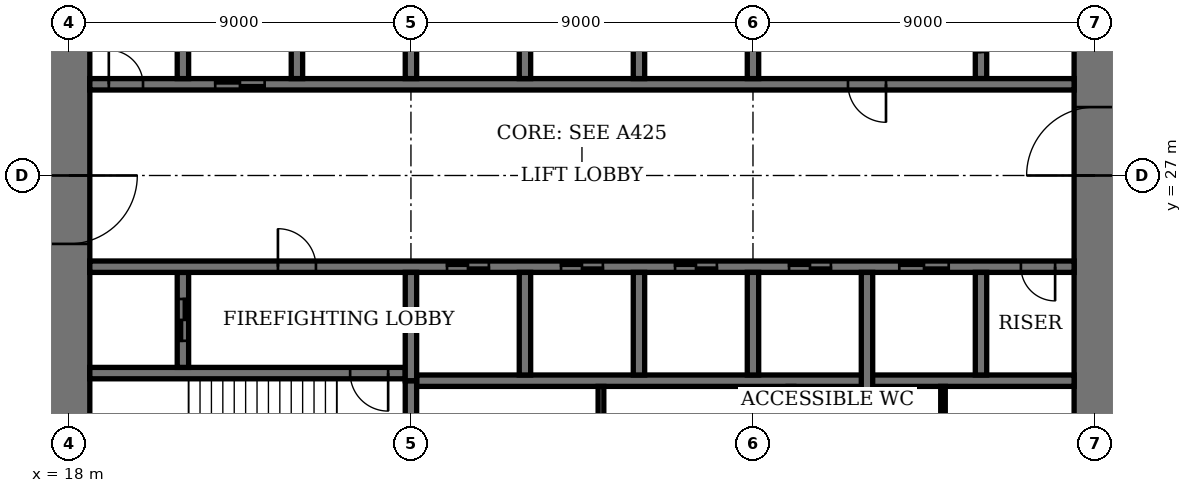
"""IFC4 building model, lengths in metres.
Left out: names, types, materials, properties, quantities, classifications, styles, units other than length and angle.
Written with IfcOpenShell. Run it as: python <this file> out.ifc"""

import sys

from ifc_helpers import new_model, si_unit, direction, frame, frame_2d, origin, place, context, subcontext, project, spatial, rectangle, extrude, element, fill, save


model = new_model("IFC4")
c1 = context("Model", 3, precision=1e-05, world=origin(), true_north=direction((0.0, 1.0)))
c2 = subcontext(c1, "Body", "Model", "MODEL_VIEW")
j1 = project(units=[si_unit("LENGTHUNIT", "METRE"), si_unit("PLANEANGLEUNIT", "RADIAN")], contexts=[c1])
p1 = place(None, origin())
s1 = spatial("IfcSite", under=j1, at=p1, CompositionType="ELEMENT")
p2 = place(p1, origin())
s2 = spatial("IfcBuilding", under=s1, at=p2, CompositionType="ELEMENT")
p3 = place(p2, frame((0.0, 0.0, 51.8)))
s3 = spatial("IfcBuildingStorey", under=s2, at=p3, CompositionType="ELEMENT", Elevation=51.8)
p4 = place(p3, frame((18.0, 35.45, 0.0), z_axis=(0.0, 0.0, 1.0), x_axis=(0.0, -1.0, 0.0)))
e1 = element("IfcWall", 1, at=p4, inside=s3, PredefinedType="SHEAR", context=c2, shape_type="SweptSolid", body=[
    extrude(rectangle(XDim=16.9, YDim=1.1, at=frame_2d((8.45, 0.0))), origin(), (0.0, 0.0, 1.0), 4.0),
])
p5 = place(p4, frame((8.45, 0.0, 0.0)))
e2 = element("IfcOpeningElement", 2, at=p5, cuts=e1, PredefinedType="OPENING", context=c2, shape_type="SweptSolid", body=[
    extrude(rectangle(XDim=1.8, YDim=2.4, at=frame_2d((0.9, 1.2))), frame((0.0, 0.56, 0.0), z_axis=(0.0, -1.0, 0.0), x_axis=(1.0, 0.0, 0.0)), (0.0, 0.0, 1.0), 1.12),
])
p6 = place(p3, frame((45.0, 18.55, 0.0), z_axis=(0.0, 0.0, 1.0), x_axis=(0.0, 1.0, 0.0)))
e3 = element("IfcWall", 3, at=p6, inside=s3, PredefinedType="SHEAR", context=c2, shape_type="SweptSolid", body=[
    extrude(rectangle(XDim=16.9, YDim=1.1, at=frame_2d((8.45, 0.0))), origin(), (0.0, 0.0, 1.0), 4.0),
])
p7 = place(p6, frame((8.45, 0.0, 0.0)))
e4 = element("IfcOpeningElement", 4, at=p7, cuts=e3, PredefinedType="OPENING", context=c2, shape_type="SweptSolid", body=[
    extrude(rectangle(XDim=1.8, YDim=2.4, at=frame_2d((0.9, 1.2))), frame((0.0, 0.56, 0.0), z_axis=(0.0, -1.0, 0.0), x_axis=(1.0, 0.0, 0.0)), (0.0, 0.0, 1.0), 1.12),
])
p8 = place(p3, frame((18.55, 21.8, 0.0), z_axis=(0.0, 0.0, 1.0), x_axis=(1.0, 0.0, 0.0)))
e5 = element("IfcWall", 5, at=p8, inside=s3, PredefinedType="SHEAR", context=c2, shape_type="SweptSolid", body=[
    extrude(rectangle(XDim=8.3, YDim=0.3, at=frame_2d((4.15, 0.0))), origin(), (0.0, 0.0, 1.0), 4.0),
])
p9 = place(p8, frame((6.85, 0.0, 0.0)))
e6 = element("IfcOpeningElement", 6, at=p9, cuts=e5, PredefinedType="OPENING", context=c2, shape_type="SweptSolid", body=[
    extrude(rectangle(XDim=1.0, YDim=2.4, at=frame_2d((0.5, 1.2))), frame((0.0, 0.16, 0.0), z_axis=(0.0, -1.0, 0.0), x_axis=(1.0, 0.0, 0.0)), (0.0, 0.0, 1.0), 0.32),
])
p10 = place(p3, frame((27.0, 18.55, 0.0), z_axis=(0.0, 0.0, 1.0), x_axis=(0.0, 1.0, 0.0)))
e7 = element("IfcWall", 7, at=p10, inside=s3, PredefinedType="SHEAR", context=c2, shape_type="SweptSolid", body=[
    extrude(rectangle(XDim=3.05, YDim=0.3, at=frame_2d((1.525, 0.0))), origin(), (0.0, 0.0, 1.0), 4.0),
])
p11 = place(p3, frame((21.0, 21.95, 0.0), z_axis=(0.0, 0.0, 1.0), x_axis=(0.0, 1.0, 0.0)))
e8 = element("IfcWall", 8, at=p11, inside=s3, PredefinedType="SHEAR", context=c2, shape_type="SweptSolid", body=[
    extrude(rectangle(XDim=2.5, YDim=0.3, at=frame_2d((1.25, 0.0))), origin(), (0.0, 0.0, 1.0), 4.0),
])
p12 = place(p11, frame((0.7, 0.0, 0.0)))
e9 = element("IfcOpeningElement", 9, at=p12, cuts=e8, PredefinedType="OPENING", context=c2, shape_type="SweptSolid", body=[
    extrude(rectangle(XDim=1.1, YDim=2.4, at=frame_2d((0.55, 1.2))), frame((0.0, 0.16, 0.0), z_axis=(0.0, -1.0, 0.0), x_axis=(1.0, 0.0, 0.0)), (0.0, 0.0, 1.0), 0.32),
])
p13 = place(p3, frame((42.0, 29.55, 0.0), z_axis=(0.0, 0.0, 1.0), x_axis=(0.0, 1.0, 0.0)))
e10 = element("IfcWall", 10, at=p13, inside=s3, PredefinedType="SHEAR", context=c2, shape_type="SweptSolid", body=[
    extrude(rectangle(XDim=2.5, YDim=0.3, at=frame_2d((1.25, 0.0))), origin(), (0.0, 0.0, 1.0), 4.0),
])
p14 = place(p13, frame((0.7, 0.0, 0.0)))
e11 = element("IfcOpeningElement", 11, at=p14, cuts=e10, PredefinedType="OPENING", context=c2, shape_type="SweptSolid", body=[
    extrude(rectangle(XDim=1.1, YDim=2.4, at=frame_2d((0.55, 1.2))), frame((0.0, 0.16, 0.0), z_axis=(0.0, -1.0, 0.0), x_axis=(1.0, 0.0, 0.0)), (0.0, 0.0, 1.0), 0.32),
])
p15 = place(p3, frame((18.55, 24.6, 0.0), z_axis=(0.0, 0.0, 1.0), x_axis=(1.0, 0.0, 0.0)))
e12 = element("IfcWall", 12, at=p15, inside=s3, PredefinedType="SHEAR", context=c2, shape_type="SweptSolid", body=[
    extrude(rectangle(XDim=25.9, YDim=0.3, at=frame_2d((12.95, 0.0))), origin(), (0.0, 0.0, 1.0), 4.0),
])
p16 = place(p15, frame((4.95, 0.0, 0.0)))
e13 = element("IfcOpeningElement", 13, at=p16, cuts=e12, PredefinedType="OPENING", context=c2, shape_type="SweptSolid", body=[
    extrude(rectangle(XDim=1.0, YDim=2.4, at=frame_2d((0.5, 1.2))), frame((0.0, 0.16, 0.0), z_axis=(0.0, -1.0, 0.0), x_axis=(1.0, 0.0, 0.0)), (0.0, 0.0, 1.0), 0.32),
])
p17 = place(p15, frame((24.5, 0.0, 0.0)))
e14 = element("IfcOpeningElement", 14, at=p17, cuts=e12, PredefinedType="OPENING", context=c2, shape_type="SweptSolid", body=[
    extrude(rectangle(XDim=0.9, YDim=2.1, at=frame_2d((0.45, 1.05))), frame((0.0, 0.16, 0.0), z_axis=(0.0, -1.0, 0.0), x_axis=(1.0, 0.0, 0.0)), (0.0, 0.0, 1.0), 0.32),
])
p18 = place(p15, frame((9.4, 0.0, 0.0)))
e15 = element("IfcOpeningElement", 15, at=p18, cuts=e12, PredefinedType="OPENING", context=c2, shape_type="SweptSolid", body=[
    extrude(rectangle(XDim=1.1, YDim=2.4, at=frame_2d((0.55, 1.2))), frame((0.0, 0.16, 0.0), z_axis=(0.0, -1.0, 0.0), x_axis=(1.0, 0.0, 0.0)), (0.0, 0.0, 1.0), 0.32),
])
p19 = place(p15, frame((12.4, 0.0, 0.0)))
e16 = element("IfcOpeningElement", 16, at=p19, cuts=e12, PredefinedType="OPENING", context=c2, shape_type="SweptSolid", body=[
    extrude(rectangle(XDim=1.1, YDim=2.4, at=frame_2d((0.55, 1.2))), frame((0.0, 0.16, 0.0), z_axis=(0.0, -1.0, 0.0), x_axis=(1.0, 0.0, 0.0)), (0.0, 0.0, 1.0), 0.32),
])
p20 = place(p15, frame((15.4, 0.0, 0.0)))
e17 = element("IfcOpeningElement", 17, at=p20, cuts=e12, PredefinedType="OPENING", context=c2, shape_type="SweptSolid", body=[
    extrude(rectangle(XDim=1.1, YDim=2.4, at=frame_2d((0.55, 1.2))), frame((0.0, 0.16, 0.0), z_axis=(0.0, -1.0, 0.0), x_axis=(1.0, 0.0, 0.0)), (0.0, 0.0, 1.0), 0.32),
])
p21 = place(p15, frame((18.4, 0.0, 0.0)))
e18 = element("IfcOpeningElement", 18, at=p21, cuts=e12, PredefinedType="OPENING", context=c2, shape_type="SweptSolid", body=[
    extrude(rectangle(XDim=1.1, YDim=2.4, at=frame_2d((0.55, 1.2))), frame((0.0, 0.16, 0.0), z_axis=(0.0, -1.0, 0.0), x_axis=(1.0, 0.0, 0.0)), (0.0, 0.0, 1.0), 0.32),
])
p22 = place(p15, frame((21.3, 0.0, 0.0)))
e19 = element("IfcOpeningElement", 19, at=p22, cuts=e12, PredefinedType="OPENING", context=c2, shape_type="SweptSolid", body=[
    extrude(rectangle(XDim=1.3, YDim=2.4, at=frame_2d((0.65, 1.2))), frame((0.0, 0.16, 0.0), z_axis=(0.0, -1.0, 0.0), x_axis=(1.0, 0.0, 0.0)), (0.0, 0.0, 1.0), 0.32),
])
p23 = place(p3, frame((18.55, 29.4, 0.0), z_axis=(0.0, 0.0, 1.0), x_axis=(1.0, 0.0, 0.0)))
e20 = element("IfcWall", 20, at=p23, inside=s3, PredefinedType="SHEAR", context=c2, shape_type="SweptSolid", body=[
    extrude(rectangle(XDim=25.9, YDim=0.3, at=frame_2d((12.95, 0.0))), origin(), (0.0, 0.0, 1.0), 4.0),
])
p24 = place(p23, frame((19.95, 0.0, 0.0)))
e21 = element("IfcOpeningElement", 21, at=p24, cuts=e20, PredefinedType="OPENING", context=c2, shape_type="SweptSolid", body=[
    extrude(rectangle(XDim=1.0, YDim=2.4, at=frame_2d((0.5, 1.2))), frame((0.0, 0.16, 0.0), z_axis=(0.0, -1.0, 0.0), x_axis=(1.0, 0.0, 0.0)), (0.0, 0.0, 1.0), 0.32),
])
p25 = place(p23, frame((0.5, 0.0, 0.0)))
e22 = element("IfcOpeningElement", 22, at=p25, cuts=e20, PredefinedType="OPENING", context=c2, shape_type="SweptSolid", body=[
    extrude(rectangle(XDim=0.9, YDim=2.1, at=frame_2d((0.45, 1.05))), frame((0.0, 0.16, 0.0), z_axis=(0.0, -1.0, 0.0), x_axis=(1.0, 0.0, 0.0)), (0.0, 0.0, 1.0), 0.32),
])
p26 = place(p23, frame((3.3, 0.0, 0.0)))
e23 = element("IfcOpeningElement", 23, at=p26, cuts=e20, PredefinedType="OPENING", context=c2, shape_type="SweptSolid", body=[
    extrude(rectangle(XDim=1.3, YDim=2.4, at=frame_2d((0.65, 1.2))), frame((0.0, 0.16, 0.0), z_axis=(0.0, -1.0, 0.0), x_axis=(1.0, 0.0, 0.0)), (0.0, 0.0, 1.0), 0.32),
])
p27 = place(p3, frame((27.15, 21.6, 0.0), z_axis=(0.0, 0.0, 1.0), x_axis=(1.0, 0.0, 0.0)))
e24 = element("IfcWall", 24, at=p27, inside=s3, PredefinedType="SHEAR", context=c2, shape_type="SweptSolid", body=[
    extrude(rectangle(XDim=17.3, YDim=0.3, at=frame_2d((8.65, 0.0))), origin(), (0.0, 0.0, 1.0), 4.0),
])
for number, where, z_axis, x_axis in (
    (25, (30.0, 21.75, 0.0), (0.0, 0.0, 1.0), (0.0, 1.0, 0.0)),
    (26, (33.0, 29.55, 0.0), (0.0, 0.0, 1.0), (0.0, 1.0, 0.0)),
    (27, (33.0, 21.75, 0.0), (0.0, 0.0, 1.0), (0.0, 1.0, 0.0)),
    (28, (30.0, 29.55, 0.0), (0.0, 0.0, 1.0), (0.0, 1.0, 0.0)),
    (29, (36.0, 21.75, 0.0), (0.0, 0.0, 1.0), (0.0, 1.0, 0.0)),
    (30, (27.0, 29.55, 0.0), (0.0, 0.0, 1.0), (0.0, 1.0, 0.0)),
):
    element("IfcWall", number, at=place(p3, frame(where, z_axis=z_axis, x_axis=x_axis)), inside=s3, PredefinedType="SHEAR", context=c2, shape_type="SweptSolid", body=[
        extrude(rectangle(XDim=2.7, YDim=0.3, at=frame_2d((1.35, 0.0))), origin(), (0.0, 0.0, 1.0), 4.0),
    ])
for number, where, z_axis, x_axis in (
    (31, (39.0, 18.55, 0.0), (0.0, 0.0, 1.0), (0.0, 1.0, 0.0)),
    (32, (24.0, 29.55, 0.0), (0.0, 0.0, 1.0), (0.0, 1.0, 0.0)),
):
    element("IfcWall", number, at=place(p3, frame(where, z_axis=z_axis, x_axis=x_axis)), inside=s3, PredefinedType="SHEAR", context=c2, shape_type="SweptSolid", body=[
        extrude(rectangle(XDim=5.9, YDim=0.3, at=frame_2d((2.95, 0.0))), origin(), (0.0, 0.0, 1.0), 4.0),
    ])
for number, where, z_axis, x_axis in (
    (33, (42.0, 21.75, 0.0), (0.0, 0.0, 1.0), (0.0, 1.0, 0.0)),
    (34, (21.0, 29.55, 0.0), (0.0, 0.0, 1.0), (0.0, 1.0, 0.0)),
):
    element("IfcWall", number, at=place(p3, frame(where, z_axis=z_axis, x_axis=x_axis)), inside=s3, PredefinedType="SHEAR", context=c2, shape_type="SweptSolid", body=[
        extrude(rectangle(XDim=2.7, YDim=0.3, at=frame_2d((1.35, 0.0))), origin(), (0.0, 0.0, 1.0), 4.0),
    ])
for number, where, z_axis, x_axis in (
    (35, (27.0, 21.6, 0.0), (0.0, 0.0, 1.0), (0.0, 1.0, 0.0)),
    (36, (36.0, 29.55, 0.0), (0.0, 0.0, 1.0), (0.0, 1.0, 0.0)),
):
    element("IfcWall", number, at=place(p3, frame(where, z_axis=z_axis, x_axis=x_axis)), inside=s3, PredefinedType="SHEAR", context=c2, shape_type="SweptSolid", body=[
        extrude(rectangle(XDim=2.85, YDim=0.3, at=frame_2d((1.425, 0.0))), origin(), (0.0, 0.0, 1.0), 4.0),
    ])
for number, where, z_axis, x_axis in (
    (37, (32.0, 18.55, 0.0), (0.0, 0.0, 1.0), (0.0, 1.0, 0.0)),
    (38, (37.0, 18.55, 0.0), (0.0, 0.0, 1.0), (0.0, 1.0, 0.0)),
):
    element("IfcWall", number, at=place(p3, frame(where, z_axis=z_axis, x_axis=x_axis)), inside=s3, PredefinedType="PARTITIONING", context=c2, shape_type="SweptSolid", body=[
        extrude(rectangle(XDim=2.9, YDim=0.15, at=frame_2d((1.45, 0.0))), origin(), (0.0, 0.0, 1.0), 3.75),
    ])
p28 = place(p3, frame((41.0, 18.55, 0.0), z_axis=(0.0, 0.0, 1.0), x_axis=(0.0, 1.0, 0.0)))
e39 = element("IfcWall", 39, at=p28, inside=s3, PredefinedType="PARTITIONING", context=c2, shape_type="SweptSolid", body=[
    extrude(rectangle(XDim=2.9, YDim=0.12, at=frame_2d((1.45, 0.0))), origin(), (0.0, 0.0, 1.0), 3.75),
])
p29 = place(p28, frame((0.95, 0.0, 0.0)))
e40 = element("IfcOpeningElement", 40, at=p29, cuts=e39, PredefinedType="OPENING", context=c2, shape_type="SweptSolid", body=[
    extrude(rectangle(XDim=1.0, YDim=2.4, at=frame_2d((0.5, 1.2))), frame((0.0, 0.07, 0.0), z_axis=(0.0, -1.0, 0.0), x_axis=(1.0, 0.0, 0.0)), (0.0, 0.0, 1.0), 0.14),
])
p30 = place(p5, origin())
e41 = element("IfcDoor", 41, at=p30, inside=s3, OperationType="DOUBLE_DOOR_DOUBLE_SWING", PredefinedType="DOOR", context=c2, shape_type="SweptSolid", body=[
    extrude(rectangle(XDim=1.8, YDim=2.4, at=frame_2d((0.9, 1.2))), frame((0.0, 0.03, 0.0), z_axis=(0.0, -1.0, 0.0), x_axis=(1.0, 0.0, 0.0)), (0.0, 0.0, 1.0), 0.06),
    extrude(rectangle(XDim=0.04, YDim=2.4, at=frame_2d((0.02, 1.2))), frame((0.0, 0.55, 0.0), z_axis=(0.0, -1.0, 0.0), x_axis=(1.0, 0.0, 0.0)), (0.0, 0.0, 1.0), 1.1),
    extrude(rectangle(XDim=0.04, YDim=2.4, at=frame_2d((1.78, 1.2))), frame((0.0, 0.55, 0.0), z_axis=(0.0, -1.0, 0.0), x_axis=(1.0, 0.0, 0.0)), (0.0, 0.0, 1.0), 1.1),
    extrude(rectangle(XDim=1.8, YDim=0.04, at=frame_2d((0.9, 2.38))), frame((0.0, 0.55, 0.0), z_axis=(0.0, -1.0, 0.0), x_axis=(1.0, 0.0, 0.0)), (0.0, 0.0, 1.0), 1.1),
])
fill(e2, e41)
p31 = place(p7, origin())
e42 = element("IfcDoor", 42, at=p31, inside=s3, OperationType="DOUBLE_DOOR_DOUBLE_SWING", PredefinedType="DOOR", context=c2, shape_type="SweptSolid", body=[
    extrude(rectangle(XDim=1.8, YDim=2.4, at=frame_2d((0.9, 1.2))), frame((0.0, 0.03, 0.0), z_axis=(0.0, -1.0, 0.0), x_axis=(1.0, 0.0, 0.0)), (0.0, 0.0, 1.0), 0.06),
    extrude(rectangle(XDim=0.04, YDim=2.4, at=frame_2d((0.02, 1.2))), frame((0.0, 0.55, 0.0), z_axis=(0.0, -1.0, 0.0), x_axis=(1.0, 0.0, 0.0)), (0.0, 0.0, 1.0), 1.1),
    extrude(rectangle(XDim=0.04, YDim=2.4, at=frame_2d((1.78, 1.2))), frame((0.0, 0.55, 0.0), z_axis=(0.0, -1.0, 0.0), x_axis=(1.0, 0.0, 0.0)), (0.0, 0.0, 1.0), 1.1),
    extrude(rectangle(XDim=1.8, YDim=0.04, at=frame_2d((0.9, 2.38))), frame((0.0, 0.55, 0.0), z_axis=(0.0, -1.0, 0.0), x_axis=(1.0, 0.0, 0.0)), (0.0, 0.0, 1.0), 1.1),
])
fill(e4, e42)
p32 = place(p9, origin())
e43 = element("IfcDoor", 43, at=p32, inside=s3, OperationType="SINGLE_SWING_RIGHT", PredefinedType="DOOR", context=c2, shape_type="SweptSolid", body=[
    extrude(rectangle(XDim=1.0, YDim=2.4, at=frame_2d((0.5, 1.2))), frame((0.0, 0.03, 0.0), z_axis=(0.0, -1.0, 0.0), x_axis=(1.0, 0.0, 0.0)), (0.0, 0.0, 1.0), 0.06),
])
fill(e6, e43)
p33 = place(p16, origin())
e44 = element("IfcDoor", 44, at=p33, inside=s3, OperationType="SINGLE_SWING_RIGHT", PredefinedType="DOOR", context=c2, shape_type="SweptSolid", body=[
    extrude(rectangle(XDim=1.0, YDim=2.4, at=frame_2d((0.5, 1.2))), frame((0.0, 0.03, 0.0), z_axis=(0.0, -1.0, 0.0), x_axis=(1.0, 0.0, 0.0)), (0.0, 0.0, 1.0), 0.06),
])
fill(e13, e44)
p34 = place(p24, origin())
e45 = element("IfcDoor", 45, at=p34, inside=s3, OperationType="SINGLE_SWING_RIGHT", PredefinedType="DOOR", context=c2, shape_type="SweptSolid", body=[
    extrude(rectangle(XDim=1.0, YDim=2.4, at=frame_2d((0.5, 1.2))), frame((0.0, 0.03, 0.0), z_axis=(0.0, -1.0, 0.0), x_axis=(1.0, 0.0, 0.0)), (0.0, 0.0, 1.0), 0.06),
])
fill(e21, e45)
p35 = place(p17, origin())
e46 = element("IfcDoor", 46, at=p35, inside=s3, OperationType="SINGLE_SWING_RIGHT", PredefinedType="DOOR", context=c2, shape_type="SweptSolid", body=[
    extrude(rectangle(XDim=0.9, YDim=2.1, at=frame_2d((0.45, 1.05))), frame((0.0, 0.03, 0.0), z_axis=(0.0, -1.0, 0.0), x_axis=(1.0, 0.0, 0.0)), (0.0, 0.0, 1.0), 0.06),
])
fill(e14, e46)
p36 = place(p25, origin())
e47 = element("IfcDoor", 47, at=p36, inside=s3, OperationType="SINGLE_SWING_RIGHT", PredefinedType="DOOR", context=c2, shape_type="SweptSolid", body=[
    extrude(rectangle(XDim=0.9, YDim=2.1, at=frame_2d((0.45, 1.05))), frame((0.0, 0.03, 0.0), z_axis=(0.0, -1.0, 0.0), x_axis=(1.0, 0.0, 0.0)), (0.0, 0.0, 1.0), 0.06),
])
fill(e22, e47)
p37 = place(p18, origin())
e48 = element("IfcDoor", 48, at=p37, inside=s3, OperationType="DOUBLE_DOOR_SLIDING", PredefinedType="DOOR", context=c2, shape_type="SweptSolid", body=[
    extrude(rectangle(XDim=1.1, YDim=2.4, at=frame_2d((0.55, 1.2))), frame((0.0, 0.02, 0.0), z_axis=(0.0, -1.0, 0.0), x_axis=(1.0, 0.0, 0.0)), (0.0, 0.0, 1.0), 0.04),
])
fill(e15, e48)
p38 = place(p19, origin())
e49 = element("IfcDoor", 49, at=p38, inside=s3, OperationType="DOUBLE_DOOR_SLIDING", PredefinedType="DOOR", context=c2, shape_type="SweptSolid", body=[
    extrude(rectangle(XDim=1.1, YDim=2.4, at=frame_2d((0.55, 1.2))), frame((0.0, 0.02, 0.0), z_axis=(0.0, -1.0, 0.0), x_axis=(1.0, 0.0, 0.0)), (0.0, 0.0, 1.0), 0.04),
])
fill(e16, e49)
p39 = place(p20, origin())
e50 = element("IfcDoor", 50, at=p39, inside=s3, OperationType="DOUBLE_DOOR_SLIDING", PredefinedType="DOOR", context=c2, shape_type="SweptSolid", body=[
    extrude(rectangle(XDim=1.1, YDim=2.4, at=frame_2d((0.55, 1.2))), frame((0.0, 0.02, 0.0), z_axis=(0.0, -1.0, 0.0), x_axis=(1.0, 0.0, 0.0)), (0.0, 0.0, 1.0), 0.04),
])
fill(e17, e50)
p40 = place(p21, origin())
e51 = element("IfcDoor", 51, at=p40, inside=s3, OperationType="DOUBLE_DOOR_SLIDING", PredefinedType="DOOR", context=c2, shape_type="SweptSolid", body=[
    extrude(rectangle(XDim=1.1, YDim=2.4, at=frame_2d((0.55, 1.2))), frame((0.0, 0.02, 0.0), z_axis=(0.0, -1.0, 0.0), x_axis=(1.0, 0.0, 0.0)), (0.0, 0.0, 1.0), 0.04),
])
fill(e18, e51)
p41 = place(p22, origin())
e52 = element("IfcDoor", 52, at=p41, inside=s3, OperationType="DOUBLE_DOOR_SLIDING", PredefinedType="DOOR", context=c2, shape_type="SweptSolid", body=[
    extrude(rectangle(XDim=1.3, YDim=2.4, at=frame_2d((0.65, 1.2))), frame((0.0, 0.02, 0.0), z_axis=(0.0, -1.0, 0.0), x_axis=(1.0, 0.0, 0.0)), (0.0, 0.0, 1.0), 0.04),
])
fill(e19, e52)
p42 = place(p26, origin())
e53 = element("IfcDoor", 53, at=p42, inside=s3, OperationType="DOUBLE_DOOR_SLIDING", PredefinedType="DOOR", context=c2, shape_type="SweptSolid", body=[
    extrude(rectangle(XDim=1.3, YDim=2.4, at=frame_2d((0.65, 1.2))), frame((0.0, 0.02, 0.0), z_axis=(0.0, -1.0, 0.0), x_axis=(1.0, 0.0, 0.0)), (0.0, 0.0, 1.0), 0.04),
])
fill(e23, e53)
p43 = place(p12, origin())
e54 = element("IfcDoor", 54, at=p43, inside=s3, OperationType="DOUBLE_DOOR_SLIDING", PredefinedType="DOOR", context=c2, shape_type="SweptSolid", body=[
    extrude(rectangle(XDim=1.1, YDim=2.4, at=frame_2d((0.55, 1.2))), frame((0.0, 0.03, 0.0), z_axis=(0.0, -1.0, 0.0), x_axis=(1.0, 0.0, 0.0)), (0.0, 0.0, 1.0), 0.06),
])
fill(e9, e54)
save(model, sys.argv[1])
